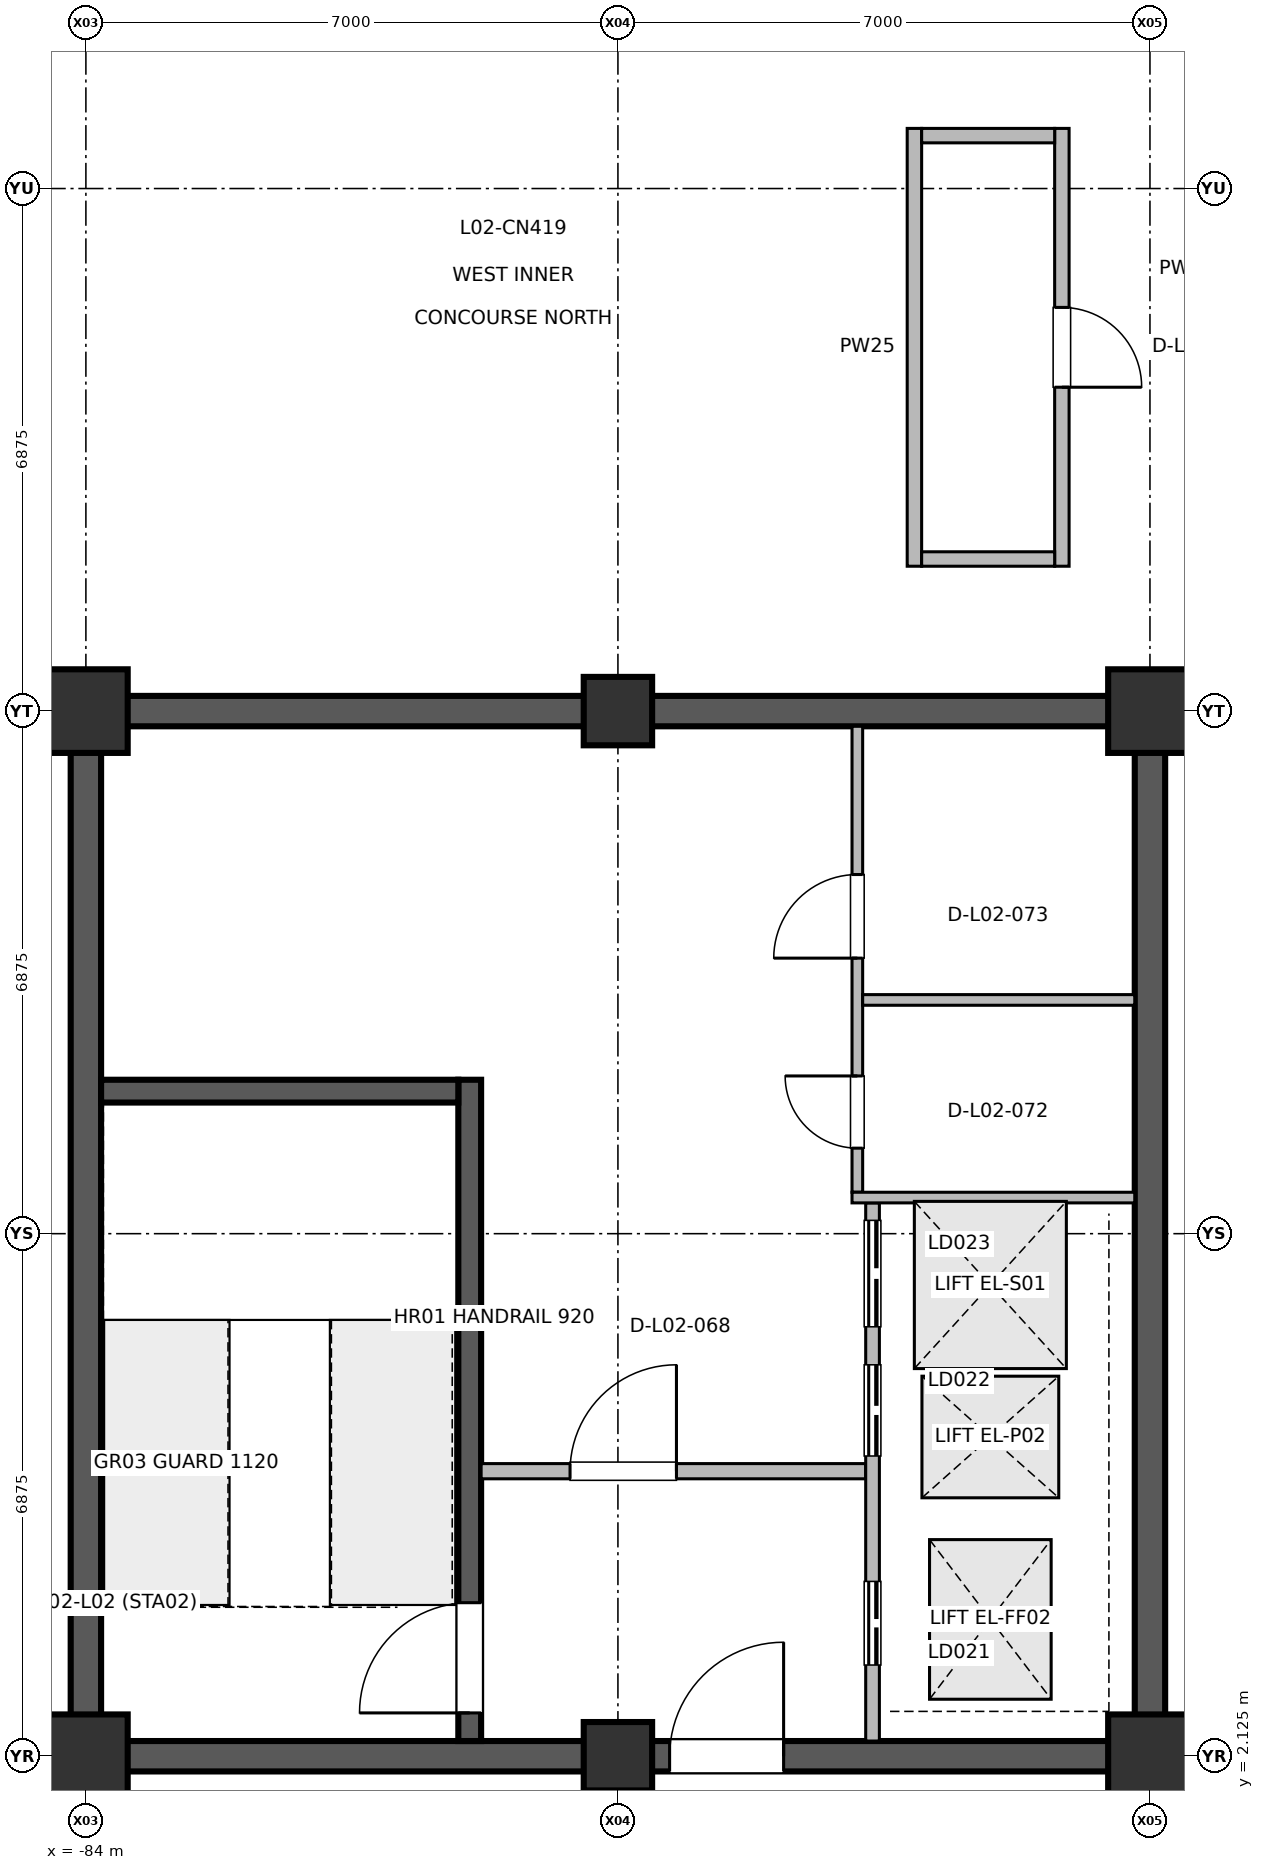
"""IFC4 building model, lengths in metres.
Left out: names, types, materials, properties, quantities, classifications, styles, units other than length and angle.
Written with IfcOpenShell. Run it as: python <this file> out.ifc"""

import sys

from ifc_helpers import new_model, si_unit, direction, frame, frame_2d, origin, origin_2d, place, context, subcontext, project, spatial, rectangle, extrude, element, fill, save


model = new_model("IFC4")
c1 = context("Model", 3, precision=1e-05, world=origin(), true_north=direction((0.0, 1.0)))
c2 = subcontext(c1, "Body", "Model", "MODEL_VIEW")
j1 = project(units=[si_unit("LENGTHUNIT", "METRE"), si_unit("PLANEANGLEUNIT", "RADIAN")], contexts=[c1])
p1 = place(None, origin())
s1 = spatial("IfcSite", under=j1, at=p1, CompositionType="ELEMENT")
p2 = place(p1, origin())
s2 = spatial("IfcBuilding", under=s1, at=p2, CompositionType="ELEMENT")
p3 = place(p2, frame((0.0, 0.0, 6.0)))
s3 = spatial("IfcBuildingStorey", under=s2, at=p3, CompositionType="ELEMENT", Elevation=6.0)
for number, where, z_axis, x_axis in (
    (1, (-84.0, 2.125, 0.0), (0.0, 0.0, 1.0), (1.0, 0.0, 0.0)),
    (2, (-84.0, 15.875, 0.0), (0.0, 0.0, 1.0), (1.0, 0.0, 0.0)),
):
    element("IfcColumn", number, at=place(p3, frame(where, z_axis=z_axis, x_axis=x_axis)), inside=s3, PredefinedType="COLUMN", context=c2, shape_type="SweptSolid", body=[
        extrude(rectangle(XDim=1.1, YDim=1.1, at=origin_2d()), origin(), (0.0, 0.0, 1.0), 5.398),
    ])
for number, where, z_axis, x_axis in (
    (3, (-77.0, 2.125, 0.0), (0.0, 0.0, 1.0), (1.0, 0.0, 0.0)),
    (4, (-77.0, 15.875, 0.0), (0.0, 0.0, 1.0), (1.0, 0.0, 0.0)),
):
    element("IfcColumn", number, at=place(p3, frame(where, z_axis=z_axis, x_axis=x_axis)), inside=s3, PredefinedType="COLUMN", context=c2, shape_type="SweptSolid", body=[
        extrude(rectangle(XDim=0.9, YDim=0.9, at=origin_2d()), origin(), (0.0, 0.0, 1.0), 5.398),
    ])
for number, where, z_axis, x_axis in (
    (5, (-70.0, 2.125, 0.0), (0.0, 0.0, 1.0), (1.0, 0.0, 0.0)),
    (6, (-70.0, 15.875, 0.0), (0.0, 0.0, 1.0), (1.0, 0.0, 0.0)),
):
    element("IfcColumn", number, at=place(p3, frame(where, z_axis=z_axis, x_axis=x_axis)), inside=s3, PredefinedType="COLUMN", context=c2, shape_type="SweptSolid", body=[
        extrude(rectangle(XDim=1.1, YDim=1.1, at=origin_2d()), origin(), (0.0, 0.0, 1.0), 5.398),
    ])
for number, where, z_axis, x_axis in (
    (7, (-84.0, 2.325, 0.0), (0.0, 0.0, 1.0), (0.0, 1.0, 0.0)),
    (8, (-70.0, 2.325, 0.0), (0.0, 0.0, 1.0), (0.0, 1.0, 0.0)),
):
    element("IfcWall", number, at=place(p3, frame(where, z_axis=z_axis, x_axis=x_axis)), inside=s3, PredefinedType="SHEAR", context=c2, shape_type="SweptSolid", body=[
        extrude(rectangle(XDim=13.35, YDim=0.4, at=frame_2d((6.675, 0.0))), origin(), (0.0, 0.0, 1.0), 5.2),
    ])
p4 = place(p3, frame((-83.8, 2.125, 0.0), z_axis=(0.0, 0.0, 1.0), x_axis=(1.0, 0.0, 0.0)))
e9 = element("IfcWall", 9, at=p4, inside=s3, PredefinedType="SHEAR", context=c2, shape_type="SweptSolid", body=[
    extrude(rectangle(XDim=13.6, YDim=0.4, at=frame_2d((6.8, 0.0))), origin(), (0.0, 0.0, 1.0), 5.2),
])
p5 = place(p4, frame((7.48, 0.0, 0.0)))
e10 = element("IfcOpeningElement", 10, at=p5, cuts=e9, PredefinedType="OPENING", context=c2, shape_type="SweptSolid", body=[
    extrude(rectangle(XDim=1.5, YDim=2.2, at=frame_2d((0.75, 1.1))), frame((0.0, 0.21, 0.0), z_axis=(0.0, -1.0, 0.0), x_axis=(1.0, 0.0, 0.0)), (0.0, 0.0, 1.0), 0.42),
])
p6 = place(p3, frame((-83.8, 15.875, 0.0), z_axis=(0.0, 0.0, 1.0), x_axis=(1.0, 0.0, 0.0)))
e11 = element("IfcWall", 11, at=p6, inside=s3, PredefinedType="SHEAR", context=c2, shape_type="SweptSolid", body=[
    extrude(rectangle(XDim=13.6, YDim=0.4, at=frame_2d((6.8, 0.0))), origin(), (0.0, 0.0, 1.0), 5.2),
])
p7 = place(p3, frame((-78.95, 2.325, 0.0), z_axis=(0.0, 0.0, 1.0), x_axis=(0.0, 1.0, 0.0)))
e12 = element("IfcWall", 12, at=p7, inside=s3, PredefinedType="SHEAR", context=c2, shape_type="SweptSolid", body=[
    extrude(rectangle(XDim=8.7, YDim=0.3, at=frame_2d((4.35, 0.0))), origin(), (0.0, 0.0, 1.0), 5.2),
])
p8 = place(p7, frame((0.37, 0.0, 0.0)))
e13 = element("IfcOpeningElement", 13, at=p8, cuts=e12, PredefinedType="OPENING", context=c2, shape_type="SweptSolid", body=[
    extrude(rectangle(XDim=1.45, YDim=2.2, at=frame_2d((0.725, 1.1))), frame((0.0, 0.16, 0.0), z_axis=(0.0, -1.0, 0.0), x_axis=(1.0, 0.0, 0.0)), (0.0, 0.0, 1.0), 0.32),
])
p9 = place(p3, frame((-78.8, 5.875, 0.0), z_axis=(0.0, 0.0, 1.0), x_axis=(1.0, 0.0, 0.0)))
e14 = element("IfcWall", 14, at=p9, inside=s3, PredefinedType="PARTITIONING", context=c2, shape_type="SweptSolid", body=[
    extrude(rectangle(XDim=5.06, YDim=0.2, at=frame_2d((2.53, 0.0))), origin(), (0.0, 0.0, 1.0), 4.42),
])
p10 = place(p9, frame((1.17, 0.0, 0.0)))
e15 = element("IfcOpeningElement", 15, at=p10, cuts=e14, PredefinedType="OPENING", context=c2, shape_type="SweptSolid", body=[
    extrude(rectangle(XDim=1.4, YDim=2.2, at=frame_2d((0.7, 1.1))), frame((0.0, 0.11, 0.0), z_axis=(0.0, -1.0, 0.0), x_axis=(1.0, 0.0, 0.0)), (0.0, 0.0, 1.0), 0.22),
])
p11 = place(p3, frame((-73.65, 2.325, 0.0), z_axis=(0.0, 0.0, 1.0), x_axis=(0.0, 1.0, 0.0)))
e16 = element("IfcWall", 16, at=p11, inside=s3, PredefinedType="PARTITIONING", context=c2, shape_type="SweptSolid", body=[
    extrude(rectangle(XDim=7.08, YDim=0.18, at=frame_2d((3.54, 0.0))), origin(), (0.0, 0.0, 1.0), 4.42),
])
p12 = place(p11, frame((1.0, 0.0, 0.0)))
e17 = element("IfcOpeningElement", 17, at=p12, cuts=e16, PredefinedType="OPENING", context=c2, shape_type="SweptSolid", body=[
    extrude(rectangle(XDim=1.1, YDim=2.2, at=frame_2d((0.55, 1.1))), frame((0.0, 0.1, 0.0), z_axis=(0.0, -1.0, 0.0), x_axis=(1.0, 0.0, 0.0)), (0.0, 0.0, 1.0), 0.2),
])
p13 = place(p11, frame((3.75, 0.0, 0.0)))
e18 = element("IfcOpeningElement", 18, at=p13, cuts=e16, PredefinedType="OPENING", context=c2, shape_type="SweptSolid", body=[
    extrude(rectangle(XDim=1.2, YDim=2.25, at=frame_2d((0.6, 1.125))), frame((0.0, 0.1, 0.0), z_axis=(0.0, -1.0, 0.0), x_axis=(1.0, 0.0, 0.0)), (0.0, 0.0, 1.0), 0.2),
])
p14 = place(p11, frame((5.45, 0.0, 0.0)))
e19 = element("IfcOpeningElement", 19, at=p14, cuts=e16, PredefinedType="OPENING", context=c2, shape_type="SweptSolid", body=[
    extrude(rectangle(XDim=1.4, YDim=2.3, at=frame_2d((0.7, 1.15))), frame((0.0, 0.1, 0.0), z_axis=(0.0, -1.0, 0.0), x_axis=(1.0, 0.0, 0.0)), (0.0, 0.0, 1.0), 0.2),
])
p15 = place(p3, frame((-73.85, 9.545, 0.0), z_axis=(0.0, 0.0, 1.0), x_axis=(0.0, 1.0, 0.0)))
e20 = element("IfcWall", 20, at=p15, inside=s3, PredefinedType="PARTITIONING", context=c2, shape_type="SweptSolid", body=[
    extrude(rectangle(XDim=6.13, YDim=0.14, at=frame_2d((3.065, 0.0))), origin(), (0.0, 0.0, 1.0), 4.42),
])
p16 = place(p15, frame((0.58, 0.0, 0.0)))
e21 = element("IfcOpeningElement", 21, at=p16, cuts=e20, PredefinedType="OPENING", context=c2, shape_type="SweptSolid", body=[
    extrude(rectangle(XDim=0.95, YDim=2.15, at=frame_2d((0.475, 1.075))), frame((0.0, 0.08, 0.0), z_axis=(0.0, -1.0, 0.0), x_axis=(1.0, 0.0, 0.0)), (0.0, 0.0, 1.0), 0.16),
])
p17 = place(p15, frame((3.08, 0.0, 0.0)))
e22 = element("IfcOpeningElement", 22, at=p17, cuts=e20, PredefinedType="OPENING", context=c2, shape_type="SweptSolid", body=[
    extrude(rectangle(XDim=1.1, YDim=2.15, at=frame_2d((0.55, 1.075))), frame((0.0, 0.08, 0.0), z_axis=(0.0, -1.0, 0.0), x_axis=(1.0, 0.0, 0.0)), (0.0, 0.0, 1.0), 0.16),
])
p18 = place(p3, frame((-71.159, 23.541, 0.0), z_axis=(0.0, 0.0, 1.0), x_axis=(0.0, -1.0, 0.0)))
e23 = element("IfcWall", 23, at=p18, inside=s3, PredefinedType="PARTITIONING", context=c2, shape_type="SweptSolid", body=[
    extrude(rectangle(XDim=5.76, YDim=0.19, at=frame_2d((2.88, 0.0))), origin(), (0.0, 0.0, 1.0), 4.42),
])
p19 = place(p18, frame((2.355, 0.0, 0.0)))
e24 = element("IfcOpeningElement", 24, at=p19, cuts=e23, PredefinedType="OPENING", context=c2, shape_type="SweptSolid", body=[
    extrude(rectangle(XDim=1.05, YDim=2.25, at=frame_2d((0.525, 1.125))), frame((0.0, 0.105, 0.0), z_axis=(0.0, -1.0, 0.0), x_axis=(1.0, 0.0, 0.0)), (0.0, 0.0, 1.0), 0.21),
])
p20 = place(p3, frame((-73.92, 9.475, 0.0), z_axis=(0.0, 0.0, 1.0), x_axis=(1.0, 0.0, 0.0)))
e25 = element("IfcWall", 25, at=p20, inside=s3, PredefinedType="PARTITIONING", context=c2, shape_type="SweptSolid", body=[
    extrude(rectangle(XDim=3.72, YDim=0.14, at=frame_2d((1.86, 0.0))), origin(), (0.0, 0.0, 1.0), 4.42),
])
p21 = place(p3, frame((-73.78, 12.075, 0.0), z_axis=(0.0, 0.0, 1.0), x_axis=(1.0, 0.0, 0.0)))
e26 = element("IfcWall", 26, at=p21, inside=s3, PredefinedType="PARTITIONING", context=c2, shape_type="SweptSolid", body=[
    extrude(rectangle(XDim=3.58, YDim=0.14, at=frame_2d((1.79, 0.0))), origin(), (0.0, 0.0, 1.0), 4.42),
])
p22 = place(p3, frame((-73.099, 17.781, 0.0), z_axis=(0.0, 0.0, 1.0), x_axis=(0.0, 1.0, 0.0)))
e27 = element("IfcWall", 27, at=p22, inside=s3, PredefinedType="PARTITIONING", context=c2, shape_type="SweptSolid", body=[
    extrude(rectangle(XDim=5.76, YDim=0.19, at=frame_2d((2.88, 0.0))), origin(), (0.0, 0.0, 1.0), 4.42),
])
for number, where, z_axis, x_axis in (
    (28, (-73.004, 17.876, 0.0), (0.0, 0.0, 1.0), (1.0, 0.0, 0.0)),
    (29, (-73.004, 23.446, 0.0), (0.0, 0.0, 1.0), (1.0, 0.0, 0.0)),
):
    element("IfcWall", number, at=place(p3, frame(where, z_axis=z_axis, x_axis=x_axis)), inside=s3, PredefinedType="PARTITIONING", context=c2, shape_type="SweptSolid", body=[
        extrude(rectangle(XDim=1.75, YDim=0.19, at=frame_2d((0.875, 0.0))), origin(), (0.0, 0.0, 1.0), 4.42),
    ])
p23 = place(p3, frame((-83.8, 10.875, 0.0), z_axis=(0.0, 0.0, 1.0), x_axis=(1.0, 0.0, 0.0)))
e30 = element("IfcWall", 30, at=p23, inside=s3, PredefinedType="SHEAR", context=c2, shape_type="SweptSolid", body=[
    extrude(rectangle(XDim=4.7, YDim=0.3, at=frame_2d((2.35, 0.0))), origin(), (0.0, 0.0, 1.0), 5.2),
])
p24 = place(p5, origin())
e31 = element("IfcDoor", 31, at=p24, inside=s3, OperationType="SINGLE_SWING_RIGHT", PredefinedType="DOOR", context=c2, shape_type="SweptSolid", body=[
    extrude(rectangle(XDim=1.5, YDim=2.2, at=frame_2d((0.75, 1.1))), frame((0.0, 0.025, 0.0), z_axis=(0.0, -1.0, 0.0), x_axis=(1.0, 0.0, 0.0)), (0.0, 0.0, 1.0), 0.05),
])
fill(e10, e31)
p25 = place(p8, origin())
e32 = element("IfcDoor", 32, at=p25, inside=s3, OperationType="SINGLE_SWING_LEFT", PredefinedType="DOOR", context=c2, shape_type="SweptSolid", body=[
    extrude(rectangle(XDim=1.45, YDim=2.2, at=frame_2d((0.725, 1.1))), frame((0.0, 0.025, 0.0), z_axis=(0.0, -1.0, 0.0), x_axis=(1.0, 0.0, 0.0)), (0.0, 0.0, 1.0), 0.05),
])
fill(e13, e32)
p26 = place(p10, origin())
e33 = element("IfcDoor", 33, at=p26, inside=s3, OperationType="SINGLE_SWING_RIGHT", PredefinedType="DOOR", context=c2, shape_type="SweptSolid", body=[
    extrude(rectangle(XDim=1.4, YDim=2.2, at=frame_2d((0.7, 1.1))), frame((0.0, 0.025, 0.0), z_axis=(0.0, -1.0, 0.0), x_axis=(1.0, 0.0, 0.0)), (0.0, 0.0, 1.0), 0.05),
])
fill(e15, e33)
p27 = place(p12, origin())
e34 = element("IfcDoor", 34, at=p27, inside=s3, OperationType="DOUBLE_DOOR_SLIDING", PredefinedType="DOOR", context=c2, shape_type="SweptSolid", body=[
    extrude(rectangle(XDim=1.1, YDim=2.2, at=frame_2d((0.55, 1.1))), frame((0.0, 0.025, 0.0), z_axis=(0.0, -1.0, 0.0), x_axis=(1.0, 0.0, 0.0)), (0.0, 0.0, 1.0), 0.05),
])
fill(e17, e34)
p28 = place(p13, origin())
e35 = element("IfcDoor", 35, at=p28, inside=s3, OperationType="DOUBLE_DOOR_SLIDING", PredefinedType="DOOR", context=c2, shape_type="SweptSolid", body=[
    extrude(rectangle(XDim=1.2, YDim=2.25, at=frame_2d((0.6, 1.125))), frame((0.0, 0.025, 0.0), z_axis=(0.0, -1.0, 0.0), x_axis=(1.0, 0.0, 0.0)), (0.0, 0.0, 1.0), 0.05),
])
fill(e18, e35)
p29 = place(p14, origin())
e36 = element("IfcDoor", 36, at=p29, inside=s3, OperationType="DOUBLE_DOOR_SLIDING", PredefinedType="DOOR", context=c2, shape_type="SweptSolid", body=[
    extrude(rectangle(XDim=1.4, YDim=2.3, at=frame_2d((0.7, 1.15))), frame((0.0, 0.025, 0.0), z_axis=(0.0, -1.0, 0.0), x_axis=(1.0, 0.0, 0.0)), (0.0, 0.0, 1.0), 0.05),
])
fill(e19, e36)
p30 = place(p16, origin())
e37 = element("IfcDoor", 37, at=p30, inside=s3, OperationType="SINGLE_SWING_RIGHT", PredefinedType="DOOR", context=c2, shape_type="SweptSolid", body=[
    extrude(rectangle(XDim=0.95, YDim=2.15, at=frame_2d((0.475, 1.075))), frame((0.0, 0.025, 0.0), z_axis=(0.0, -1.0, 0.0), x_axis=(1.0, 0.0, 0.0)), (0.0, 0.0, 1.0), 0.05),
])
fill(e21, e37)
p31 = place(p17, origin())
e38 = element("IfcDoor", 38, at=p31, inside=s3, OperationType="SINGLE_SWING_LEFT", PredefinedType="DOOR", context=c2, shape_type="SweptSolid", body=[
    extrude(rectangle(XDim=1.1, YDim=2.15, at=frame_2d((0.55, 1.075))), frame((0.0, 0.025, 0.0), z_axis=(0.0, -1.0, 0.0), x_axis=(1.0, 0.0, 0.0)), (0.0, 0.0, 1.0), 0.05),
])
fill(e22, e38)
p32 = place(p19, origin())
e39 = element("IfcDoor", 39, at=p32, inside=s3, OperationType="SINGLE_SWING_RIGHT", PredefinedType="DOOR", context=c2, shape_type="SweptSolid", body=[
    extrude(rectangle(XDim=1.05, YDim=2.25, at=frame_2d((0.525, 1.125))), frame((0.0, 0.025, 0.0), z_axis=(0.0, -1.0, 0.0), x_axis=(1.0, 0.0, 0.0)), (0.0, 0.0, 1.0), 0.05),
])
fill(e24, e39)
save(model, sys.argv[1])
